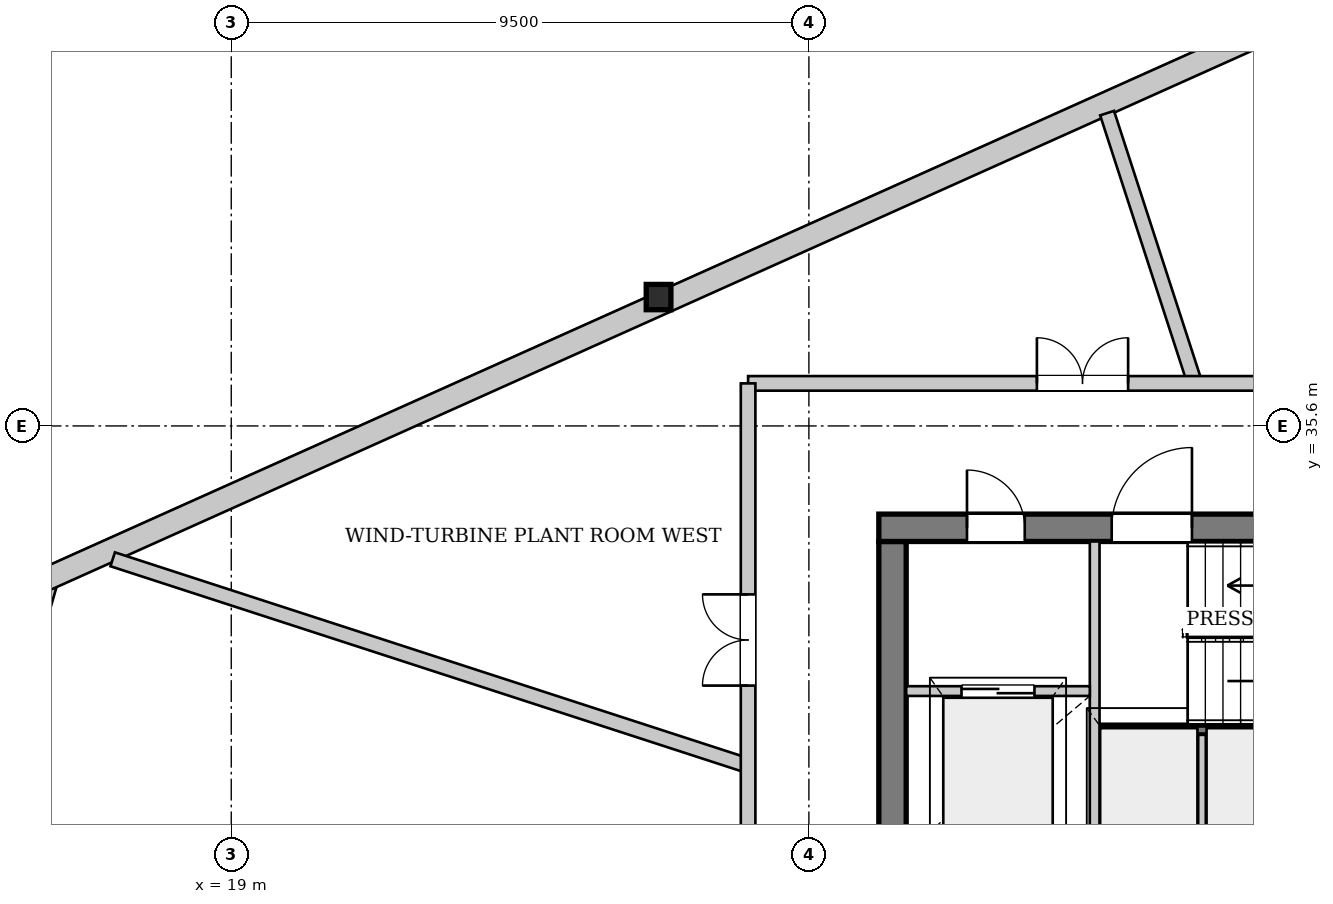
"""IFC4 building model, lengths in metres.
Left out: names, types, materials, properties, quantities, classifications, styles, units other than length and angle.
Written with IfcOpenShell. Run it as: python <this file> out.ifc"""

import sys

from ifc_helpers import new_model, si_unit, direction, frame, frame_2d, origin, origin_2d, place, context, subcontext, project, spatial, rectangle, i_section, extrude, source, transform, mapped, element, fill, save


model = new_model("IFC4")
c1 = context("Model", 3, precision=1e-05, world=origin(), true_north=direction((0.0, 1.0)))
c2 = subcontext(c1, "Body", "Model", "MODEL_VIEW")
j1 = project(units=[si_unit("LENGTHUNIT", "METRE"), si_unit("PLANEANGLEUNIT", "RADIAN")], contexts=[c1])
p1 = place(None, origin())
s1 = spatial("IfcSite", under=j1, at=p1, CompositionType="ELEMENT")
p2 = place(p1, origin())
s2 = spatial("IfcBuilding", under=s1, at=p2, CompositionType="ELEMENT")
p3 = place(p2, frame((0.0, 0.0, 204.3)))
s3 = spatial("IfcBuildingStorey", under=s2, at=p3, CompositionType="ELEMENT", Elevation=204.3)
m1 = source(origin(), c2, "Body", "SweptSolid", [
    extrude(i_section(OverallWidth=0.406, OverallDepth=0.416, WebThickness=0.027, FlangeThickness=0.042, at=origin_2d()), origin(), (0.0, 0.0, 1.0), 5.143),
])
p4 = place(p3, frame((26.104, 37.842, 0.0), z_axis=(-0.0297632018, -0.047659098256, 0.998420133096), x_axis=(0.848188094291, -0.529695154502, 0.0)))
e1 = element("IfcColumn", 1, at=p4, inside=s3, PredefinedType="COLUMN", context=c2, shape_type="MappedRepresentation", body=[
    mapped(m1, transform((0.0, 0.0, 0.0), x_axis=(1.0, 0.0, 0.0), y_axis=(0.0, 1.0, 0.0), z_axis=(0.0, 0.0, 1.0), scale=1.0)),
])
p5 = place(p3, frame((24.242, 14.344, 0.0), z_axis=(0.0, 0.0, 1.0), x_axis=(-0.531419317525, 0.847108912101, 0.0)))
e2 = element("IfcWall", 2, at=p5, inside=s3, PredefinedType="SOLIDWALL", context=c2, shape_type="SweptSolid", body=[
    extrude(rectangle(XDim=17.712, YDim=0.38, at=frame_2d((8.856, 0.0))), origin(), (0.0, 0.0, 1.0), 4.572),
])
p6 = place(p3, frame((14.851, 29.194, 0.0), z_axis=(0.0, 0.0, 1.0), x_axis=(0.27564088165, 0.961260684915, 0.0)))
e3 = element("IfcWall", 3, at=p6, inside=s3, PredefinedType="SOLIDWALL", context=c2, shape_type="SweptSolid", body=[
    extrude(rectangle(XDim=4.136, YDim=0.38, at=frame_2d((2.068, 0.0))), origin(), (0.0, 0.0, 1.0), 4.572),
])
p7 = place(p3, frame((15.886, 33.05, 0.0), z_axis=(0.0, 0.0, 1.0), x_axis=(0.912383830261, 0.409335737845, 0.0)))
e4 = element("IfcWall", 4, at=p7, inside=s3, PredefinedType="SOLIDWALL", context=c2, shape_type="SweptSolid", body=[
    extrude(rectangle(XDim=22.569, YDim=0.38, at=frame_2d((11.284, 0.0))), origin(), (0.0, 0.0, 1.0), 4.572),
])
p8 = place(p3, frame((29.875, 19.5, 0.0), z_axis=(0.0, 0.0, 1.0), x_axis=(0.0, 1.0, 0.0)))
e5 = element("IfcWall", 5, at=p8, inside=s3, PredefinedType="SHEAR", context=c2, shape_type="SweptSolid", body=[
    extrude(rectangle(XDim=14.2, YDim=0.45, at=frame_2d((7.1, 0.0))), origin(), (0.0, 0.0, 1.0), 5.08),
])
p9 = place(p8, frame((7.42, 0.0, 0.0)))
e6 = element("IfcOpeningElement", 6, at=p9, cuts=e5, PredefinedType="OPENING", context=c2, shape_type="SweptSolid", body=[
    extrude(rectangle(XDim=1.6, YDim=2.2, at=frame_2d((0.8, 1.1))), frame((0.0, 0.235, 0.0), z_axis=(0.0, -1.0, 0.0), x_axis=(1.0, 0.0, 0.0)), (0.0, 0.0, 1.0), 0.47),
])
p10 = place(p3, frame((29.65, 33.925, 0.0), z_axis=(0.0, 0.0, 1.0), x_axis=(1.0, 0.0, 0.0)))
e7 = element("IfcWall", 7, at=p10, inside=s3, PredefinedType="SHEAR", context=c2, shape_type="SweptSolid", body=[
    extrude(rectangle(XDim=16.7, YDim=0.45, at=frame_2d((8.35, 0.0))), origin(), (0.0, 0.0, 1.0), 5.08),
])
p11 = place(p10, frame((1.45, 0.0, 0.0)))
e8 = element("IfcOpeningElement", 8, at=p11, cuts=e7, PredefinedType="OPENING", context=c2, shape_type="SweptSolid", body=[
    extrude(rectangle(XDim=0.95, YDim=2.1, at=frame_2d((0.475, 1.05))), frame((0.0, 0.235, 0.0), z_axis=(0.0, -1.0, 0.0), x_axis=(1.0, 0.0, 0.0)), (0.0, 0.0, 1.0), 0.47),
])
p12 = place(p10, frame((3.83, 0.0, 0.0)))
e9 = element("IfcOpeningElement", 9, at=p12, cuts=e7, PredefinedType="OPENING", context=c2, shape_type="SweptSolid", body=[
    extrude(rectangle(XDim=1.32, YDim=2.2, at=frame_2d((0.66, 1.1))), frame((0.0, 0.235, 0.0), z_axis=(0.0, -1.0, 0.0), x_axis=(1.0, 0.0, 0.0)), (0.0, 0.0, 1.0), 0.47),
])
p13 = place(p3, frame((33.28, 30.6, 0.0), z_axis=(0.0, 0.0, 1.0), x_axis=(1.0, 0.0, 0.0)))
e10 = element("IfcWall", 10, at=p13, inside=s3, PredefinedType="PARTITIONING", context=c2, shape_type="SweptSolid", body=[
    extrude(rectangle(XDim=7.3, YDim=0.16, at=frame_2d((3.65, 0.0))), origin(), (0.0, 0.0, 1.0), 5.08),
])
p14 = place(p3, frame((33.2, 28.44, 0.0), z_axis=(0.0, 0.0, 1.0), x_axis=(0.0, 1.0, 0.0)))
e11 = element("IfcWall", 11, at=p14, inside=s3, PredefinedType="PARTITIONING", context=c2, shape_type="SweptSolid", body=[
    extrude(rectangle(XDim=5.26, YDim=0.16, at=frame_2d((2.63, 0.0))), origin(), (0.0, 0.0, 1.0), 5.08),
])
p15 = place(p3, frame((30.1, 31.24, 0.0), z_axis=(0.0, 0.0, 1.0), x_axis=(1.0, 0.0, 0.0)))
e12 = element("IfcWall", 12, at=p15, inside=s3, PredefinedType="PARTITIONING", context=c2, shape_type="SweptSolid", body=[
    extrude(rectangle(XDim=3.02, YDim=0.16, at=frame_2d((1.51, 0.0))), origin(), (0.0, 0.0, 1.0), 5.08),
])
p16 = place(p15, frame((0.91, 0.0, 0.0)))
e13 = element("IfcOpeningElement", 13, at=p16, cuts=e12, PredefinedType="OPENING", context=c2, shape_type="SweptSolid", body=[
    extrude(rectangle(XDim=1.2, YDim=2.2, at=frame_2d((0.6, 1.1))), frame((0.0, 0.09, 0.0), z_axis=(0.0, -1.0, 0.0), x_axis=(1.0, 0.0, 0.0)), (0.0, 0.0, 1.0), 0.18),
])
p17 = place(p3, frame((34.965, 28.6, 0.0), z_axis=(0.0, 0.0, 1.0), x_axis=(0.0, 1.0, 0.0)))
e14 = element("IfcWall", 14, at=p17, inside=s3, PredefinedType="PARTITIONING", context=c2, shape_type="SweptSolid", body=[
    extrude(rectangle(XDim=1.92, YDim=0.125, at=frame_2d((0.96, 0.0))), origin(), (0.0, 0.0, 1.0), 5.08),
])
p18 = place(p3, frame((34.848, 36.3, 0.0), z_axis=(0.0, 0.0, 1.0), x_axis=(-0.309024642633, 0.951054031191, 0.0)))
e15 = element("IfcWall", 15, at=p18, inside=s3, PredefinedType="PARTITIONING", context=c2, shape_type="SweptSolid", body=[
    extrude(rectangle(XDim=4.673, YDim=0.24, at=frame_2d((2.336, 0.0))), origin(), (0.0, 0.0, 1.0), 5.08),
])
p19 = place(p3, frame((27.5, 30.012, 0.0), z_axis=(0.0, 0.0, 1.0), x_axis=(-0.951062149422, 0.308999656855, 0.0)))
e16 = element("IfcWall", 16, at=p19, inside=s3, PredefinedType="PARTITIONING", context=c2, shape_type="SweptSolid", body=[
    extrude(rectangle(XDim=10.988, YDim=0.24, at=frame_2d((5.494, 0.0))), origin(), (0.0, 0.0, 1.0), 5.08),
])
p20 = place(p3, frame((27.5, 36.3, 0.0), z_axis=(0.0, 0.0, 1.0), x_axis=(1.0, 0.0, 0.0)))
e17 = element("IfcWall", 17, at=p20, inside=s3, PredefinedType="PARTITIONING", context=c2, shape_type="SweptSolid", body=[
    extrude(rectangle(XDim=21.0, YDim=0.24, at=frame_2d((10.5, 0.0))), origin(), (0.0, 0.0, 1.0), 5.08),
])
p21 = place(p20, frame((4.75, 0.0, 0.0)))
e18 = element("IfcOpeningElement", 18, at=p21, cuts=e17, PredefinedType="OPENING", context=c2, shape_type="SweptSolid", body=[
    extrude(rectangle(XDim=1.5, YDim=2.25, at=frame_2d((0.75, 1.125))), frame((0.0, 0.13, 0.0), z_axis=(0.0, -1.0, 0.0), x_axis=(1.0, 0.0, 0.0)), (0.0, 0.0, 1.0), 0.26),
])
p22 = place(p20, frame((13.95, 0.0, 0.0)))
e19 = element("IfcOpeningElement", 19, at=p22, cuts=e17, PredefinedType="OPENING", context=c2, shape_type="SweptSolid", body=[
    extrude(rectangle(XDim=1.5, YDim=2.25, at=frame_2d((0.75, 1.125))), frame((0.0, 0.13, 0.0), z_axis=(0.0, -1.0, 0.0), x_axis=(1.0, 0.0, 0.0)), (0.0, 0.0, 1.0), 0.26),
])
p23 = place(p3, frame((27.5, 16.9, 0.0), z_axis=(0.0, 0.0, 1.0), x_axis=(0.0, 1.0, 0.0)))
e20 = element("IfcWall", 20, at=p23, inside=s3, PredefinedType="PARTITIONING", context=c2, shape_type="SweptSolid", body=[
    extrude(rectangle(XDim=19.4, YDim=0.24, at=frame_2d((9.7, 0.0))), origin(), (0.0, 0.0, 1.0), 5.08),
])
p24 = place(p23, frame((5.07, 0.0, 0.0)))
e21 = element("IfcOpeningElement", 21, at=p24, cuts=e20, PredefinedType="OPENING", context=c2, shape_type="SweptSolid", body=[
    extrude(rectangle(XDim=1.5, YDim=2.25, at=frame_2d((0.75, 1.125))), frame((0.0, 0.13, 0.0), z_axis=(0.0, -1.0, 0.0), x_axis=(1.0, 0.0, 0.0)), (0.0, 0.0, 1.0), 0.26),
])
p25 = place(p23, frame((14.43, 0.0, 0.0)))
e22 = element("IfcOpeningElement", 22, at=p25, cuts=e20, PredefinedType="OPENING", context=c2, shape_type="SweptSolid", body=[
    extrude(rectangle(XDim=1.5, YDim=2.25, at=frame_2d((0.75, 1.125))), frame((0.0, 0.13, 0.0), z_axis=(0.0, -1.0, 0.0), x_axis=(1.0, 0.0, 0.0)), (0.0, 0.0, 1.0), 0.26),
])
m2 = source(origin(), c2, "Body", "SweptSolid", [
    extrude(rectangle(XDim=0.95, YDim=2.1, at=frame_2d((0.475, 1.05))), frame((0.0, 0.025, 0.0), z_axis=(0.0, -1.0, 0.0), x_axis=(1.0, 0.0, 0.0)), (0.0, 0.0, 1.0), 0.05),
])
p26 = place(p11, origin())
e23 = element("IfcDoor", 23, at=p26, inside=s3, OperationType="SINGLE_SWING_LEFT", PredefinedType="DOOR", context=c2, shape_type="MappedRepresentation", body=[
    mapped(m2, transform((0.0, 0.0, 0.0), x_axis=(1.0, 0.0, 0.0), y_axis=(0.0, 1.0, 0.0), z_axis=(0.0, 0.0, 1.0), scale=1.0)),
])
fill(e8, e23)
m3 = source(origin(), c2, "Body", "SweptSolid", [
    extrude(rectangle(XDim=1.32, YDim=2.2, at=frame_2d((0.66, 1.1))), frame((0.0, 0.025, 0.0), z_axis=(0.0, -1.0, 0.0), x_axis=(1.0, 0.0, 0.0)), (0.0, 0.0, 1.0), 0.05),
])
p27 = place(p12, origin())
e24 = element("IfcDoor", 24, at=p27, inside=s3, OperationType="SINGLE_SWING_RIGHT", PredefinedType="DOOR", context=c2, shape_type="MappedRepresentation", body=[
    mapped(m3, transform((0.0, 0.0, 0.0), x_axis=(1.0, 0.0, 0.0), y_axis=(0.0, 1.0, 0.0), z_axis=(0.0, 0.0, 1.0), scale=1.0)),
])
fill(e9, e24)
m4 = source(origin(), c2, "Body", "SweptSolid", [
    extrude(rectangle(XDim=1.2, YDim=2.2, at=frame_2d((0.6, 1.1))), frame((0.0, 0.025, 0.0), z_axis=(0.0, -1.0, 0.0), x_axis=(1.0, 0.0, 0.0)), (0.0, 0.0, 1.0), 0.05),
])
p28 = place(p16, origin())
e25 = element("IfcDoor", 25, at=p28, inside=s3, OperationType="DOUBLE_DOOR_SLIDING", PredefinedType="DOOR", context=c2, shape_type="MappedRepresentation", body=[
    mapped(m4, transform((0.0, 0.0, 0.0), x_axis=(1.0, 0.0, 0.0), y_axis=(0.0, 1.0, 0.0), z_axis=(0.0, 0.0, 1.0), scale=1.0)),
])
fill(e13, e25)
m5 = source(origin(), c2, "Body", "SweptSolid", [
    extrude(rectangle(XDim=1.5, YDim=2.25, at=frame_2d((0.75, 1.125))), frame((0.0, 0.025, 0.0), z_axis=(0.0, -1.0, 0.0), x_axis=(1.0, 0.0, 0.0)), (0.0, 0.0, 1.0), 0.05),
])
p29 = place(p21, origin())
e26 = element("IfcDoor", 26, at=p29, inside=s3, OperationType="DOUBLE_DOOR_SINGLE_SWING", PredefinedType="DOOR", context=c2, shape_type="MappedRepresentation", body=[
    mapped(m5, transform((0.0, 0.0, 0.0), x_axis=(1.0, 0.0, 0.0), y_axis=(0.0, 1.0, 0.0), z_axis=(0.0, 0.0, 1.0), scale=1.0)),
])
fill(e18, e26)
p30 = place(p25, origin())
e27 = element("IfcDoor", 27, at=p30, inside=s3, OperationType="DOUBLE_DOOR_SINGLE_SWING", PredefinedType="DOOR", context=c2, shape_type="MappedRepresentation", body=[
    mapped(m5, transform((0.0, 0.0, 0.0), x_axis=(1.0, 0.0, 0.0), y_axis=(0.0, 1.0, 0.0), z_axis=(0.0, 0.0, 1.0), scale=1.0)),
])
fill(e22, e27)
save(model, sys.argv[1])
